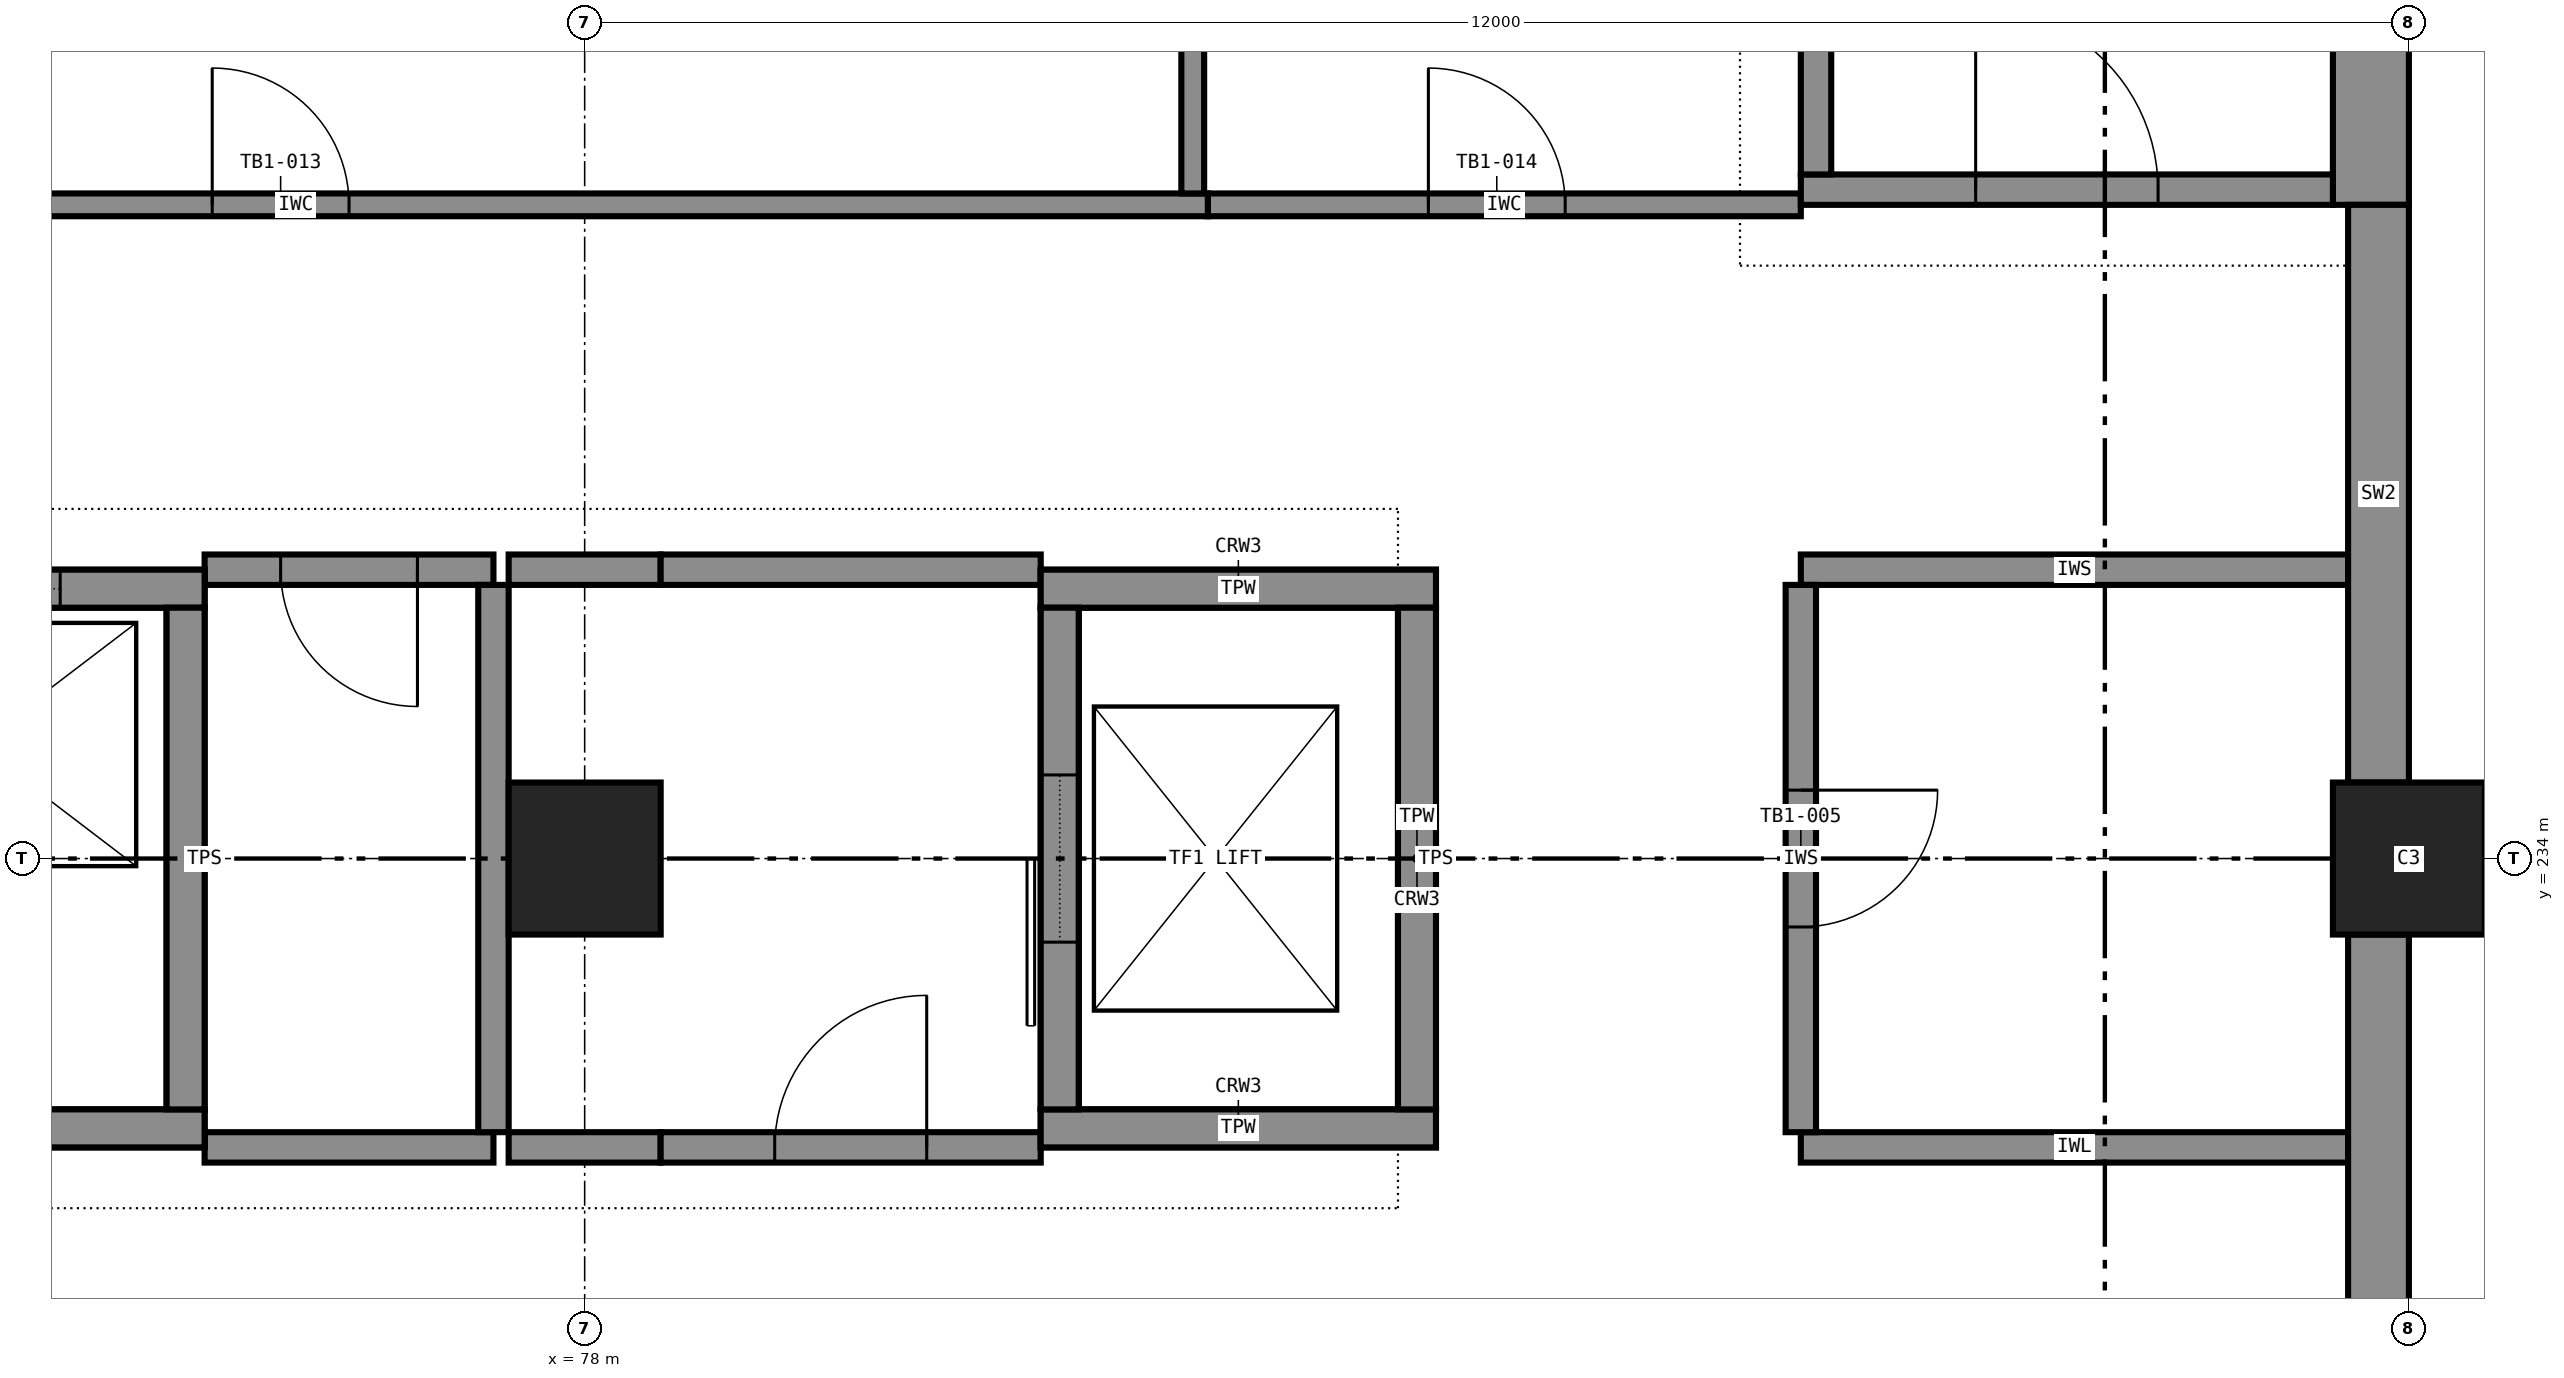
"""IFC4 building model, lengths in metres.
Left out: names, types, materials, properties, quantities, classifications, styles, units other than length and angle.
Written with IfcOpenShell. Run it as: python <this file> out.ifc"""

import sys

from ifc_helpers import new_model, si_unit, direction, frame, frame_2d, origin, origin_2d, place, context, subcontext, project, spatial, rectangle, extrude, element, fill, save


model = new_model("IFC4")
c1 = context("Model", 3, precision=1e-05, world=origin(), true_north=direction((0.0, 1.0)))
c2 = subcontext(c1, "Body", "Model", "MODEL_VIEW")
j1 = project(units=[si_unit("LENGTHUNIT", "METRE"), si_unit("PLANEANGLEUNIT", "RADIAN")], contexts=[c1])
p1 = place(None, origin())
s1 = spatial("IfcSite", under=j1, at=p1, CompositionType="ELEMENT")
p2 = place(p1, origin())
s2 = spatial("IfcBuilding", under=s1, at=p2, CompositionType="ELEMENT")
p3 = place(p2, frame((0.0, 0.0, -6.0)))
s3 = spatial("IfcBuildingStorey", under=s2, at=p3, CompositionType="ELEMENT", Elevation=-6.0)
for number, where, z_axis, x_axis in (
    (1, (78.0, 234.0, -0.4), (0.0, 0.0, 1.0), (1.0, 0.0, 0.0)),
    (2, (90.0, 234.0, -0.4), (0.0, 0.0, 1.0), (1.0, 0.0, 0.0)),
):
    element("IfcColumn", number, at=place(p3, frame(where, z_axis=z_axis, x_axis=x_axis)), inside=s3, PredefinedType="COLUMN", context=c2, shape_type="SweptSolid", body=[
        extrude(rectangle(XDim=1.0, YDim=1.0, at=origin_2d()), origin(), (0.0, 0.0, 1.0), 6.4),
    ])
p4 = place(p3, frame((89.75, 238.3, 0.0), z_axis=(0.0, 0.0, 1.0), x_axis=(0.0, 1.0, 0.0)))
e3 = element("IfcWall", 3, at=p4, inside=s3, PredefinedType="SHEAR", context=c2, shape_type="SweptSolid", body=[
    extrude(rectangle(XDim=7.2, YDim=0.5, at=frame_2d((3.6, 0.0))), origin(), (0.0, 0.0, 1.0), 5.7),
])
p5 = place(p3, frame((86.0, 238.4, 0.0), z_axis=(0.0, 0.0, 1.0), x_axis=(1.0, 0.0, 0.0)))
e4 = element("IfcWall", 4, at=p5, inside=s3, PredefinedType="SHEAR", context=c2, shape_type="SweptSolid", body=[
    extrude(rectangle(XDim=3.5, YDim=0.2, at=frame_2d((1.75, 0.0))), origin(), (0.0, 0.0, 1.0), 6.0),
])
p6 = place(p5, frame((1.15, 0.0, 0.0)))
e5 = element("IfcOpeningElement", 5, at=p6, cuts=e4, PredefinedType="OPENING", context=c2, shape_type="SweptSolid", body=[
    extrude(rectangle(XDim=1.2, YDim=2.1, at=frame_2d((0.6, 1.05))), frame((0.0, 0.11, 0.0), z_axis=(0.0, -1.0, 0.0), x_axis=(1.0, 0.0, 0.0)), (0.0, 0.0, 1.0), 0.22),
])
p7 = place(p3, frame((86.1, 238.5, 0.0), z_axis=(0.0, 0.0, 1.0), x_axis=(0.0, 1.0, 0.0)))
e6 = element("IfcWall", 6, at=p7, inside=s3, PredefinedType="SHEAR", context=c2, shape_type="SweptSolid", body=[
    extrude(rectangle(XDim=7.0, YDim=0.2, at=frame_2d((3.5, 0.0))), origin(), (0.0, 0.0, 1.0), 6.0),
])
p8 = place(p3, frame((72.5, 232.225, 0.0), z_axis=(0.0, 0.0, 1.0), x_axis=(1.0, 0.0, 0.0)))
e7 = element("IfcWall", 7, at=p8, inside=s3, PredefinedType="SHEAR", context=c2, shape_type="SweptSolid", body=[
    extrude(rectangle(XDim=3.0, YDim=0.25, at=frame_2d((1.5, 0.0))), origin(), (0.0, 0.0, 1.0), 6.0),
])
p9 = place(p3, frame((72.5, 235.775, 0.0), z_axis=(0.0, 0.0, 1.0), x_axis=(1.0, 0.0, 0.0)))
e8 = element("IfcWall", 8, at=p9, inside=s3, PredefinedType="SHEAR", context=c2, shape_type="SweptSolid", body=[
    extrude(rectangle(XDim=3.0, YDim=0.25, at=frame_2d((1.5, 0.0))), origin(), (0.0, 0.0, 1.0), 6.0),
])
p10 = place(p9, frame((0.95, 0.0, 0.0)))
e9 = element("IfcOpeningElement", 9, at=p10, cuts=e8, PredefinedType="OPENING", context=c2, shape_type="SweptSolid", body=[
    extrude(rectangle(XDim=1.1, YDim=2.1, at=frame_2d((0.55, 1.05))), frame((0.0, 0.135, 0.0), z_axis=(0.0, -1.0, 0.0), x_axis=(1.0, 0.0, 0.0)), (0.0, 0.0, 1.0), 0.27),
])
p11 = place(p3, frame((75.375, 232.35, 0.0), z_axis=(0.0, 0.0, 1.0), x_axis=(0.0, 1.0, 0.0)))
e10 = element("IfcWall", 10, at=p11, inside=s3, PredefinedType="SHEAR", context=c2, shape_type="SweptSolid", body=[
    extrude(rectangle(XDim=3.3, YDim=0.25, at=frame_2d((1.65, 0.0))), origin(), (0.0, 0.0, 1.0), 6.0),
])
for number, where, z_axis, x_axis in (
    (11, (81.0, 232.225, 0.0), (0.0, 0.0, 1.0), (1.0, 0.0, 0.0)),
    (12, (81.0, 235.775, 0.0), (0.0, 0.0, 1.0), (1.0, 0.0, 0.0)),
):
    element("IfcWall", number, at=place(p3, frame(where, z_axis=z_axis, x_axis=x_axis)), inside=s3, PredefinedType="SHEAR", context=c2, shape_type="SweptSolid", body=[
        extrude(rectangle(XDim=2.6, YDim=0.25, at=frame_2d((1.3, 0.0))), origin(), (0.0, 0.0, 1.0), 6.0),
    ])
p12 = place(p3, frame((81.125, 232.35, 0.0), z_axis=(0.0, 0.0, 1.0), x_axis=(0.0, 1.0, 0.0)))
e13 = element("IfcWall", 13, at=p12, inside=s3, PredefinedType="SHEAR", context=c2, shape_type="SweptSolid", body=[
    extrude(rectangle(XDim=3.3, YDim=0.25, at=frame_2d((1.65, 0.0))), origin(), (0.0, 0.0, 1.0), 6.0),
])
p13 = place(p12, frame((1.1, 0.0, 0.0)))
e14 = element("IfcOpeningElement", 14, at=p13, cuts=e13, PredefinedType="OPENING", context=c2, shape_type="SweptSolid", body=[
    extrude(rectangle(XDim=1.1, YDim=2.1, at=frame_2d((0.55, 1.05))), frame((0.0, 0.135, 0.0), z_axis=(0.0, -1.0, 0.0), x_axis=(1.0, 0.0, 0.0)), (0.0, 0.0, 1.0), 0.27),
])
p14 = place(p3, frame((83.475, 232.35, 0.0), z_axis=(0.0, 0.0, 1.0), x_axis=(0.0, 1.0, 0.0)))
e15 = element("IfcWall", 15, at=p14, inside=s3, PredefinedType="SHEAR", context=c2, shape_type="SweptSolid", body=[
    extrude(rectangle(XDim=3.3, YDim=0.25, at=frame_2d((1.65, 0.0))), origin(), (0.0, 0.0, 1.0), 6.0),
])
p15 = place(p3, frame((89.8, 222.0, 0.0), z_axis=(0.0, 0.0, 1.0), x_axis=(0.0, 1.0, 0.0)))
e16 = element("IfcWall", 16, at=p15, inside=s3, PredefinedType="SOLIDWALL", context=c2, shape_type="SweptSolid", body=[
    extrude(rectangle(XDim=11.5, YDim=0.4, at=frame_2d((5.75, 0.0))), origin(), (0.0, 0.0, 1.0), 5.7),
])
p16 = place(p3, frame((89.8, 234.5, 0.0), z_axis=(0.0, 0.0, 1.0), x_axis=(0.0, 1.0, 0.0)))
e17 = element("IfcWall", 17, at=p16, inside=s3, PredefinedType="SOLIDWALL", context=c2, shape_type="SweptSolid", body=[
    extrude(rectangle(XDim=3.8, YDim=0.4, at=frame_2d((1.9, 0.0))), origin(), (0.0, 0.0, 1.0), 5.7),
])
p17 = place(p3, frame((75.5, 232.1, 0.0), z_axis=(0.0, 0.0, 1.0), x_axis=(1.0, 0.0, 0.0)))
e18 = element("IfcWall", 18, at=p17, inside=s3, PredefinedType="PARTITIONING", context=c2, shape_type="SweptSolid", body=[
    extrude(rectangle(XDim=1.9, YDim=0.2, at=frame_2d((0.95, 0.0))), origin(), (0.0, 0.0, 1.0), 5.7),
])
p18 = place(p3, frame((77.5, 232.1, 0.0), z_axis=(0.0, 0.0, 1.0), x_axis=(1.0, 0.0, 0.0)))
e19 = element("IfcWall", 19, at=p18, inside=s3, PredefinedType="PARTITIONING", context=c2, shape_type="SweptSolid", body=[
    extrude(rectangle(XDim=1.0, YDim=0.2, at=frame_2d((0.5, 0.0))), origin(), (0.0, 0.0, 1.0), 5.7),
])
p19 = place(p3, frame((78.5, 232.1, 0.0), z_axis=(0.0, 0.0, 1.0), x_axis=(1.0, 0.0, 0.0)))
e20 = element("IfcWall", 20, at=p19, inside=s3, PredefinedType="PARTITIONING", context=c2, shape_type="SweptSolid", body=[
    extrude(rectangle(XDim=2.5, YDim=0.2, at=frame_2d((1.25, 0.0))), origin(), (0.0, 0.0, 1.0), 5.7),
])
p20 = place(p19, frame((0.75, 0.0, 0.0)))
e21 = element("IfcOpeningElement", 21, at=p20, cuts=e20, PredefinedType="OPENING", context=c2, shape_type="SweptSolid", body=[
    extrude(rectangle(XDim=1.0, YDim=2.1, at=frame_2d((0.5, 1.05))), frame((0.0, 0.11, 0.0), z_axis=(0.0, -1.0, 0.0), x_axis=(1.0, 0.0, 0.0)), (0.0, 0.0, 1.0), 0.22),
])
p21 = place(p3, frame((86.0, 232.1, 0.0), z_axis=(0.0, 0.0, 1.0), x_axis=(1.0, 0.0, 0.0)))
e22 = element("IfcWall", 22, at=p21, inside=s3, PredefinedType="PARTITIONING", context=c2, shape_type="SweptSolid", body=[
    extrude(rectangle(XDim=3.6, YDim=0.2, at=frame_2d((1.8, 0.0))), origin(), (0.0, 0.0, 1.0), 5.7),
])
p22 = place(p3, frame((77.4, 235.9, 0.0), z_axis=(0.0, 0.0, 1.0), x_axis=(-1.0, 0.0, 0.0)))
e23 = element("IfcWall", 23, at=p22, inside=s3, PredefinedType="PARTITIONING", context=c2, shape_type="SweptSolid", body=[
    extrude(rectangle(XDim=1.9, YDim=0.2, at=frame_2d((0.95, 0.0))), origin(), (0.0, 0.0, 1.0), 5.7),
])
p23 = place(p22, frame((0.5, 0.0, 0.0)))
e24 = element("IfcOpeningElement", 24, at=p23, cuts=e23, PredefinedType="OPENING", context=c2, shape_type="SweptSolid", body=[
    extrude(rectangle(XDim=0.9, YDim=2.1, at=frame_2d((0.45, 1.05))), frame((0.0, 0.11, 0.0), z_axis=(0.0, -1.0, 0.0), x_axis=(1.0, 0.0, 0.0)), (0.0, 0.0, 1.0), 0.22),
])
p24 = place(p3, frame((77.5, 235.9, 0.0), z_axis=(0.0, 0.0, 1.0), x_axis=(1.0, 0.0, 0.0)))
e25 = element("IfcWall", 25, at=p24, inside=s3, PredefinedType="PARTITIONING", context=c2, shape_type="SweptSolid", body=[
    extrude(rectangle(XDim=1.0, YDim=0.2, at=frame_2d((0.5, 0.0))), origin(), (0.0, 0.0, 1.0), 5.7),
])
p25 = place(p3, frame((78.5, 235.9, 0.0), z_axis=(0.0, 0.0, 1.0), x_axis=(1.0, 0.0, 0.0)))
e26 = element("IfcWall", 26, at=p25, inside=s3, PredefinedType="PARTITIONING", context=c2, shape_type="SweptSolid", body=[
    extrude(rectangle(XDim=2.5, YDim=0.2, at=frame_2d((1.25, 0.0))), origin(), (0.0, 0.0, 1.0), 5.7),
])
for number, where, z_axis, x_axis in (
    (27, (86.0, 235.9, 0.0), (0.0, 0.0, 1.0), (1.0, 0.0, 0.0)),
    (28, (77.4, 232.2, 0.0), (0.0, 0.0, 1.0), (0.0, 1.0, 0.0)),
):
    element("IfcWall", number, at=place(p3, frame(where, z_axis=z_axis, x_axis=x_axis)), inside=s3, PredefinedType="PARTITIONING", context=c2, shape_type="SweptSolid", body=[
        extrude(rectangle(XDim=3.6, YDim=0.2, at=frame_2d((1.8, 0.0))), origin(), (0.0, 0.0, 1.0), 5.7),
    ])
p26 = place(p3, frame((86.0, 235.8, 0.0), z_axis=(0.0, 0.0, 1.0), x_axis=(0.0, -1.0, 0.0)))
e29 = element("IfcWall", 29, at=p26, inside=s3, PredefinedType="PARTITIONING", context=c2, shape_type="SweptSolid", body=[
    extrude(rectangle(XDim=3.6, YDim=0.2, at=frame_2d((1.8, 0.0))), origin(), (0.0, 0.0, 1.0), 5.7),
])
p27 = place(p26, frame((1.35, 0.0, 0.0)))
e30 = element("IfcOpeningElement", 30, at=p27, cuts=e29, PredefinedType="OPENING", context=c2, shape_type="SweptSolid", body=[
    extrude(rectangle(XDim=0.9, YDim=2.1, at=frame_2d((0.45, 1.05))), frame((0.0, 0.11, 0.0), z_axis=(0.0, -1.0, 0.0), x_axis=(1.0, 0.0, 0.0)), (0.0, 0.0, 1.0), 0.22),
])
p28 = place(p3, frame((70.1, 238.3, 0.0), z_axis=(0.0, 0.0, 1.0), x_axis=(1.0, 0.0, 0.0)))
e31 = element("IfcWall", 31, at=p28, inside=s3, PredefinedType="PARTITIONING", context=c2, shape_type="SweptSolid", body=[
    extrude(rectangle(XDim=12.0, YDim=0.15, at=frame_2d((6.0, 0.0))), origin(), (0.0, 0.0, 1.0), 5.7),
])
p29 = place(p28, frame((5.45, 0.0, 0.0)))
e32 = element("IfcOpeningElement", 32, at=p29, cuts=e31, PredefinedType="OPENING", context=c2, shape_type="SweptSolid", body=[
    extrude(rectangle(XDim=0.9, YDim=2.1, at=frame_2d((0.45, 1.05))), frame((0.0, 0.085, 0.0), z_axis=(0.0, -1.0, 0.0), x_axis=(1.0, 0.0, 0.0)), (0.0, 0.0, 1.0), 0.17),
])
p30 = place(p3, frame((82.1, 238.3, 0.0), z_axis=(0.0, 0.0, 1.0), x_axis=(1.0, 0.0, 0.0)))
e33 = element("IfcWall", 33, at=p30, inside=s3, PredefinedType="PARTITIONING", context=c2, shape_type="SweptSolid", body=[
    extrude(rectangle(XDim=3.9, YDim=0.15, at=frame_2d((1.95, 0.0))), origin(), (0.0, 0.0, 1.0), 5.7),
])
p31 = place(p30, frame((1.45, 0.0, 0.0)))
e34 = element("IfcOpeningElement", 34, at=p31, cuts=e33, PredefinedType="OPENING", context=c2, shape_type="SweptSolid", body=[
    extrude(rectangle(XDim=0.9, YDim=2.1, at=frame_2d((0.45, 1.05))), frame((0.0, 0.085, 0.0), z_axis=(0.0, -1.0, 0.0), x_axis=(1.0, 0.0, 0.0)), (0.0, 0.0, 1.0), 0.17),
])
p32 = place(p3, frame((82.0, 245.6, 0.0), z_axis=(0.0, 0.0, 1.0), x_axis=(0.0, -1.0, 0.0)))
e35 = element("IfcWall", 35, at=p32, inside=s3, PredefinedType="PARTITIONING", context=c2, shape_type="SweptSolid", body=[
    extrude(rectangle(XDim=7.225, YDim=0.15, at=frame_2d((3.613, 0.0))), origin(), (0.0, 0.0, 1.0), 5.7),
])
for number, where, z_axis, x_axis in (
    (36, (72.5, 232.225, -1.6), (0.0, 0.0, 1.0), (1.0, 0.0, 0.0)),
    (37, (72.5, 235.775, -1.6), (0.0, 0.0, 1.0), (1.0, 0.0, 0.0)),
):
    element("IfcWall", number, at=place(p3, frame(where, z_axis=z_axis, x_axis=x_axis)), inside=s3, PredefinedType="SOLIDWALL", context=c2, shape_type="SweptSolid", body=[
        extrude(rectangle(XDim=3.0, YDim=0.25, at=frame_2d((1.5, 0.0))), origin(), (0.0, 0.0, 1.0), 1.6),
    ])
p33 = place(p3, frame((75.375, 232.35, -1.6), z_axis=(0.0, 0.0, 1.0), x_axis=(0.0, 1.0, 0.0)))
e38 = element("IfcWall", 38, at=p33, inside=s3, PredefinedType="SOLIDWALL", context=c2, shape_type="SweptSolid", body=[
    extrude(rectangle(XDim=3.3, YDim=0.25, at=frame_2d((1.65, 0.0))), origin(), (0.0, 0.0, 1.0), 1.6),
])
for number, where, z_axis, x_axis in (
    (39, (81.0, 232.225, -1.6), (0.0, 0.0, 1.0), (1.0, 0.0, 0.0)),
    (40, (81.0, 235.775, -1.6), (0.0, 0.0, 1.0), (1.0, 0.0, 0.0)),
):
    element("IfcWall", number, at=place(p3, frame(where, z_axis=z_axis, x_axis=x_axis)), inside=s3, PredefinedType="SOLIDWALL", context=c2, shape_type="SweptSolid", body=[
        extrude(rectangle(XDim=2.6, YDim=0.25, at=frame_2d((1.3, 0.0))), origin(), (0.0, 0.0, 1.0), 1.6),
    ])
for number, where, z_axis, x_axis in (
    (41, (81.125, 232.35, -1.6), (0.0, 0.0, 1.0), (0.0, 1.0, 0.0)),
    (42, (83.475, 232.35, -1.6), (0.0, 0.0, 1.0), (0.0, 1.0, 0.0)),
):
    element("IfcWall", number, at=place(p3, frame(where, z_axis=z_axis, x_axis=x_axis)), inside=s3, PredefinedType="SOLIDWALL", context=c2, shape_type="SweptSolid", body=[
        extrude(rectangle(XDim=3.3, YDim=0.25, at=frame_2d((1.65, 0.0))), origin(), (0.0, 0.0, 1.0), 1.6),
    ])
p34 = place(p23, origin())
e43 = element("IfcDoor", 43, at=p34, inside=s3, OperationType="SINGLE_SWING_LEFT", PredefinedType="DOOR", context=c2, shape_type="SweptSolid", body=[
    extrude(rectangle(XDim=0.9, YDim=2.1, at=frame_2d((0.45, 1.05))), frame((0.0, 0.025, 0.0), z_axis=(0.0, -1.0, 0.0), x_axis=(1.0, 0.0, 0.0)), (0.0, 0.0, 1.0), 0.05),
])
fill(e24, e43)
p35 = place(p20, origin())
e44 = element("IfcDoor", 44, at=p35, inside=s3, OperationType="SINGLE_SWING_RIGHT", PredefinedType="DOOR", context=c2, shape_type="SweptSolid", body=[
    extrude(rectangle(XDim=1.0, YDim=2.1, at=frame_2d((0.5, 1.05))), frame((0.0, 0.025, 0.0), z_axis=(0.0, -1.0, 0.0), x_axis=(1.0, 0.0, 0.0)), (0.0, 0.0, 1.0), 0.05),
])
fill(e21, e44)
p36 = place(p27, origin())
e45 = element("IfcDoor", 45, at=p36, inside=s3, OperationType="SINGLE_SWING_LEFT", PredefinedType="DOOR", context=c2, shape_type="SweptSolid", body=[
    extrude(rectangle(XDim=0.9, YDim=2.1, at=frame_2d((0.45, 1.05))), frame((0.0, 0.025, 0.0), z_axis=(0.0, -1.0, 0.0), x_axis=(1.0, 0.0, 0.0)), (0.0, 0.0, 1.0), 0.05),
])
fill(e30, e45)
p37 = place(p29, origin())
e46 = element("IfcDoor", 46, at=p37, inside=s3, OperationType="SINGLE_SWING_LEFT", PredefinedType="DOOR", context=c2, shape_type="SweptSolid", body=[
    extrude(rectangle(XDim=0.9, YDim=2.1, at=frame_2d((0.45, 1.05))), frame((0.0, 0.025, 0.0), z_axis=(0.0, -1.0, 0.0), x_axis=(1.0, 0.0, 0.0)), (0.0, 0.0, 1.0), 0.05),
])
fill(e32, e46)
p38 = place(p31, origin())
e47 = element("IfcDoor", 47, at=p38, inside=s3, OperationType="SINGLE_SWING_LEFT", PredefinedType="DOOR", context=c2, shape_type="SweptSolid", body=[
    extrude(rectangle(XDim=0.9, YDim=2.1, at=frame_2d((0.45, 1.05))), frame((0.0, 0.025, 0.0), z_axis=(0.0, -1.0, 0.0), x_axis=(1.0, 0.0, 0.0)), (0.0, 0.0, 1.0), 0.05),
])
fill(e34, e47)
p39 = place(p10, origin())
e48 = element("IfcDoor", 48, at=p39, inside=s3, OperationType="SLIDING_TO_LEFT", PredefinedType="DOOR", context=c2, shape_type="SweptSolid", body=[
    extrude(rectangle(XDim=1.1, YDim=2.1, at=frame_2d((0.55, 1.05))), frame((0.0, 0.025, 0.0), z_axis=(0.0, -1.0, 0.0), x_axis=(1.0, 0.0, 0.0)), (0.0, 0.0, 1.0), 0.05),
])
fill(e9, e48)
p40 = place(p13, origin())
e49 = element("IfcDoor", 49, at=p40, inside=s3, OperationType="SLIDING_TO_LEFT", PredefinedType="DOOR", context=c2, shape_type="SweptSolid", body=[
    extrude(rectangle(XDim=1.1, YDim=2.1, at=frame_2d((0.55, 1.05))), frame((0.0, 0.025, 0.0), z_axis=(0.0, -1.0, 0.0), x_axis=(1.0, 0.0, 0.0)), (0.0, 0.0, 1.0), 0.05),
])
fill(e14, e49)
p41 = place(p6, origin())
e50 = element("IfcDoor", 50, at=p41, inside=s3, OperationType="SINGLE_SWING_LEFT", PredefinedType="DOOR", context=c2, shape_type="SweptSolid", body=[
    extrude(rectangle(XDim=1.2, YDim=2.1, at=frame_2d((0.6, 1.05))), frame((0.0, 0.025, 0.0), z_axis=(0.0, -1.0, 0.0), x_axis=(1.0, 0.0, 0.0)), (0.0, 0.0, 1.0), 0.05),
])
fill(e5, e50)
save(model, sys.argv[1])
